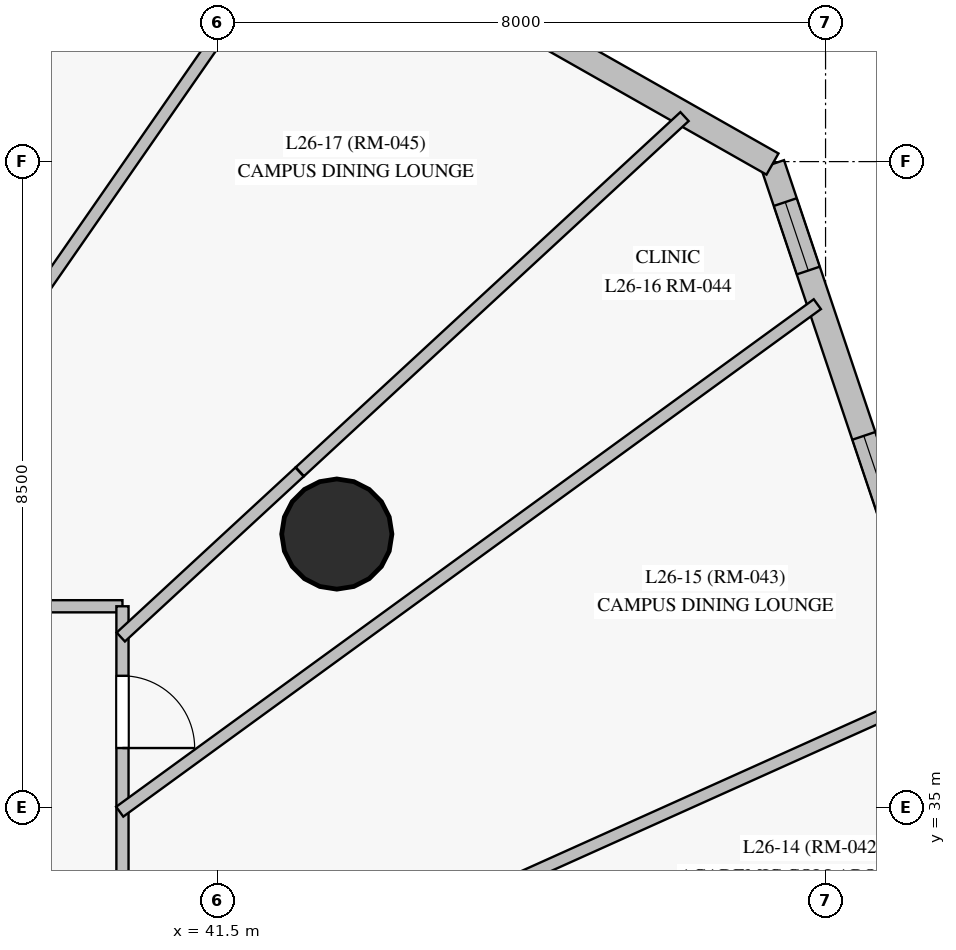
"""IFC4 building model, lengths in metres.
Left out: names, types, materials, properties, quantities, classifications, styles, units other than length and angle.
Written with IfcOpenShell. Run it as: python <this file> out.ifc"""

import sys

from ifc_helpers import new_model, si_unit, direction, frame, frame_2d, origin, origin_with_axes, origin_2d, place, context, subcontext, project, spatial, rectangle, circle, extrude, source, transform, mapped, element, fill, save


model = new_model("IFC4")
c1 = context("Model", 3, precision=1e-05, world=origin(), true_north=direction((0.0, 1.0)))
c2 = subcontext(c1, "Body", "Model", "MODEL_VIEW")
j1 = project(units=[si_unit("LENGTHUNIT", "METRE"), si_unit("PLANEANGLEUNIT", "RADIAN")], contexts=[c1])
p1 = place(None, origin())
s1 = spatial("IfcSite", under=j1, at=p1, CompositionType="ELEMENT")
p2 = place(p1, origin())
s2 = spatial("IfcBuilding", under=s1, at=p2, CompositionType="ELEMENT")
p3 = place(p2, frame((0.0, 0.0, 99.25)))
s3 = spatial("IfcBuildingStorey", under=s2, at=p3, CompositionType="ELEMENT", Elevation=99.25)
m1 = source(origin_with_axes(), c2, "Body", "SweptSolid", [
    extrude(circle(Radius=0.725, at=origin_2d()), origin(), (0.0, 0.0, 1.0), 3.05),
])
p4 = place(p3, frame((43.07, 38.6, 0.0), z_axis=(0.0, 0.0, 1.0), x_axis=(1.0, 0.0, 0.0)))
e1 = element("IfcColumn", 1, at=p4, inside=s3, PredefinedType="COLUMN", context=c2, shape_type="MappedRepresentation", body=[
    mapped(m1, transform((0.0, 0.0, 0.0), scale=1.0)),
])
p5 = place(p3, frame((51.986, 33.989, 0.0), z_axis=(0.0, 0.0, 1.0), x_axis=(-0.318475543546, 0.947931077749, 0.0)))
e2 = element("IfcWall", 2, at=p5, inside=s3, PredefinedType="SOLIDWALL", context=c2, shape_type="SweptSolid", body=[
    extrude(rectangle(XDim=10.0, YDim=0.32, at=frame_2d((5.0, 0.0))), origin(), (0.0, 0.0, 1.0), 2.825),
])
p6 = place(p5, frame((0.58, 0.0, 0.85)))
e3 = element("IfcOpeningElement", 3, at=p6, cuts=e2, PredefinedType="OPENING", context=c2, shape_type="SweptSolid", body=[
    extrude(rectangle(XDim=1.65, YDim=1.65, at=frame_2d((0.825, 0.825))), frame((0.0, 0.17, 0.0), z_axis=(0.0, -1.0, 0.0), x_axis=(1.0, 0.0, 0.0)), (0.0, 0.0, 1.0), 0.34),
])
p7 = place(p5, frame((4.577, 0.0, 0.85)))
e4 = element("IfcOpeningElement", 4, at=p7, cuts=e2, PredefinedType="OPENING", context=c2, shape_type="SweptSolid", body=[
    extrude(rectangle(XDim=1.65, YDim=1.65, at=frame_2d((0.825, 0.825))), frame((0.0, 0.17, 0.0), z_axis=(0.0, -1.0, 0.0), x_axis=(1.0, 0.0, 0.0)), (0.0, 0.0, 1.0), 0.34),
])
p8 = place(p5, frame((8.521, 0.0, 0.85)))
e5 = element("IfcOpeningElement", 5, at=p8, cuts=e2, PredefinedType="OPENING", context=c2, shape_type="SweptSolid", body=[
    extrude(rectangle(XDim=0.95, YDim=1.5, at=frame_2d((0.475, 0.75))), frame((0.0, 0.17, 0.0), z_axis=(0.0, -1.0, 0.0), x_axis=(1.0, 0.0, 0.0)), (0.0, 0.0, 1.0), 0.34),
])
p9 = place(p3, frame((48.802, 43.468, 0.0), z_axis=(0.0, 0.0, 1.0), x_axis=(-0.869711119525, 0.49356110926, 0.0)))
e6 = element("IfcWall", 6, at=p9, inside=s3, PredefinedType="SOLIDWALL", context=c2, shape_type="SweptSolid", body=[
    extrude(rectangle(XDim=12.474, YDim=0.32, at=frame_2d((6.237, 0.0))), origin(), (0.0, 0.0, 1.0), 2.825),
])
p10 = place(p9, frame((3.327, 0.0, 0.85)))
e7 = element("IfcOpeningElement", 7, at=p10, cuts=e6, PredefinedType="OPENING", context=c2, shape_type="SweptSolid", body=[
    extrude(rectangle(XDim=1.65, YDim=1.65, at=frame_2d((0.825, 0.825))), frame((0.0, 0.17, 0.0), z_axis=(0.0, -1.0, 0.0), x_axis=(1.0, 0.0, 0.0)), (0.0, 0.0, 1.0), 0.34),
])
p11 = place(p9, frame((7.578, 0.0, 0.85)))
e8 = element("IfcOpeningElement", 8, at=p11, cuts=e6, PredefinedType="OPENING", context=c2, shape_type="SweptSolid", body=[
    extrude(rectangle(XDim=1.65, YDim=1.65, at=frame_2d((0.825, 0.825))), frame((0.0, 0.17, 0.0), z_axis=(0.0, -1.0, 0.0), x_axis=(1.0, 0.0, 0.0)), (0.0, 0.0, 1.0), 0.34),
])
p12 = place(p9, frame((10.296, 0.0, 0.85)))
e9 = element("IfcOpeningElement", 9, at=p12, cuts=e6, PredefinedType="OPENING", context=c2, shape_type="SweptSolid", body=[
    extrude(rectangle(XDim=1.65, YDim=1.65, at=frame_2d((0.825, 0.825))), frame((0.0, 0.17, 0.0), z_axis=(0.0, -1.0, 0.0), x_axis=(1.0, 0.0, 0.0)), (0.0, 0.0, 1.0), 0.34),
])
p13 = place(p3, frame((10.613, 37.65, 0.0), z_axis=(0.0, 0.0, 1.0), x_axis=(1.0, 0.0, 0.0)))
e10 = element("IfcWall", 10, at=p13, inside=s3, PredefinedType="PARTITIONING", context=c2, shape_type="SweptSolid", body=[
    extrude(rectangle(XDim=29.637, YDim=0.16, at=frame_2d((14.819, 0.0))), origin(), (0.0, 0.0, 1.0), 2.325),
])
p14 = place(p13, frame((27.147, 0.0, 0.0)))
e11 = element("IfcOpeningElement", 11, at=p14, cuts=e10, PredefinedType="OPENING", context=c2, shape_type="SweptSolid", body=[
    extrude(rectangle(XDim=0.95, YDim=2.15, at=frame_2d((0.475, 1.075))), frame((0.0, 0.09, 0.0), z_axis=(0.0, -1.0, 0.0), x_axis=(1.0, 0.0, 0.0)), (0.0, 0.0, 1.0), 0.18),
])
p15 = place(p13, frame((24.44, 0.0, 0.0)))
e12 = element("IfcOpeningElement", 12, at=p15, cuts=e10, PredefinedType="OPENING", context=c2, shape_type="SweptSolid", body=[
    extrude(rectangle(XDim=0.95, YDim=2.15, at=frame_2d((0.475, 1.075))), frame((0.0, 0.09, 0.0), z_axis=(0.0, -1.0, 0.0), x_axis=(1.0, 0.0, 0.0)), (0.0, 0.0, 1.0), 0.18),
])
p16 = place(p13, frame((22.358, 0.0, 0.0)))
e13 = element("IfcOpeningElement", 13, at=p16, cuts=e10, PredefinedType="OPENING", context=c2, shape_type="SweptSolid", body=[
    extrude(rectangle(XDim=0.95, YDim=2.15, at=frame_2d((0.475, 1.075))), frame((0.0, 0.09, 0.0), z_axis=(0.0, -1.0, 0.0), x_axis=(1.0, 0.0, 0.0)), (0.0, 0.0, 1.0), 0.18),
])
p17 = place(p13, frame((20.084, 0.0, 0.0)))
e14 = element("IfcOpeningElement", 14, at=p17, cuts=e10, PredefinedType="OPENING", context=c2, shape_type="SweptSolid", body=[
    extrude(rectangle(XDim=0.95, YDim=2.15, at=frame_2d((0.475, 1.075))), frame((0.0, 0.09, 0.0), z_axis=(0.0, -1.0, 0.0), x_axis=(1.0, 0.0, 0.0)), (0.0, 0.0, 1.0), 0.18),
])
p18 = place(p13, frame((18.225, 0.0, 0.0)))
e15 = element("IfcOpeningElement", 15, at=p18, cuts=e10, PredefinedType="OPENING", context=c2, shape_type="SweptSolid", body=[
    extrude(rectangle(XDim=0.95, YDim=2.15, at=frame_2d((0.475, 1.075))), frame((0.0, 0.09, 0.0), z_axis=(0.0, -1.0, 0.0), x_axis=(1.0, 0.0, 0.0)), (0.0, 0.0, 1.0), 0.18),
])
p19 = place(p13, frame((15.805, 0.0, 0.0)))
e16 = element("IfcOpeningElement", 16, at=p19, cuts=e10, PredefinedType="OPENING", context=c2, shape_type="SweptSolid", body=[
    extrude(rectangle(XDim=0.95, YDim=2.15, at=frame_2d((0.475, 1.075))), frame((0.0, 0.09, 0.0), z_axis=(0.0, -1.0, 0.0), x_axis=(1.0, 0.0, 0.0)), (0.0, 0.0, 1.0), 0.18),
])
p20 = place(p13, frame((10.148, 0.0, 0.0)))
e17 = element("IfcOpeningElement", 17, at=p20, cuts=e10, PredefinedType="OPENING", context=c2, shape_type="SweptSolid", body=[
    extrude(rectangle(XDim=0.95, YDim=2.15, at=frame_2d((0.475, 1.075))), frame((0.0, 0.09, 0.0), z_axis=(0.0, -1.0, 0.0), x_axis=(1.0, 0.0, 0.0)), (0.0, 0.0, 1.0), 0.18),
])
p21 = place(p13, frame((7.296, 0.0, 0.0)))
e18 = element("IfcOpeningElement", 18, at=p21, cuts=e10, PredefinedType="OPENING", context=c2, shape_type="SweptSolid", body=[
    extrude(rectangle(XDim=0.95, YDim=2.15, at=frame_2d((0.475, 1.075))), frame((0.0, 0.09, 0.0), z_axis=(0.0, -1.0, 0.0), x_axis=(1.0, 0.0, 0.0)), (0.0, 0.0, 1.0), 0.18),
])
p22 = place(p3, frame((40.25, 37.65, 0.0), z_axis=(0.0, 0.0, 1.0), x_axis=(0.0, -1.0, 0.0)))
e19 = element("IfcWall", 19, at=p22, inside=s3, PredefinedType="PARTITIONING", context=c2, shape_type="SweptSolid", body=[
    extrude(rectangle(XDim=22.3, YDim=0.16, at=frame_2d((11.15, 0.0))), origin(), (0.0, 0.0, 1.0), 2.225),
])
p23 = place(p22, frame((18.866, 0.0, 0.0)))
e20 = element("IfcOpeningElement", 20, at=p23, cuts=e19, PredefinedType="OPENING", context=c2, shape_type="SweptSolid", body=[
    extrude(rectangle(XDim=0.95, YDim=2.15, at=frame_2d((0.475, 1.075))), frame((0.0, 0.09, 0.0), z_axis=(0.0, -1.0, 0.0), x_axis=(1.0, 0.0, 0.0)), (0.0, 0.0, 1.0), 0.18),
])
p24 = place(p22, frame((11.015, 0.0, 0.0)))
e21 = element("IfcOpeningElement", 21, at=p24, cuts=e19, PredefinedType="OPENING", context=c2, shape_type="SweptSolid", body=[
    extrude(rectangle(XDim=0.95, YDim=2.15, at=frame_2d((0.475, 1.075))), frame((0.0, 0.09, 0.0), z_axis=(0.0, -1.0, 0.0), x_axis=(1.0, 0.0, 0.0)), (0.0, 0.0, 1.0), 0.18),
])
p25 = place(p22, frame((8.866, 0.0, 0.0)))
e22 = element("IfcOpeningElement", 22, at=p25, cuts=e19, PredefinedType="OPENING", context=c2, shape_type="SweptSolid", body=[
    extrude(rectangle(XDim=0.95, YDim=2.15, at=frame_2d((0.475, 1.075))), frame((0.0, 0.09, 0.0), z_axis=(0.0, -1.0, 0.0), x_axis=(1.0, 0.0, 0.0)), (0.0, 0.0, 1.0), 0.18),
])
p26 = place(p22, frame((6.84, 0.0, 0.0)))
e23 = element("IfcOpeningElement", 23, at=p26, cuts=e19, PredefinedType="OPENING", context=c2, shape_type="SweptSolid", body=[
    extrude(rectangle(XDim=0.95, YDim=2.15, at=frame_2d((0.475, 1.075))), frame((0.0, 0.09, 0.0), z_axis=(0.0, -1.0, 0.0), x_axis=(1.0, 0.0, 0.0)), (0.0, 0.0, 1.0), 0.18),
])
p27 = place(p22, frame((4.56, 0.0, 0.0)))
e24 = element("IfcOpeningElement", 24, at=p27, cuts=e19, PredefinedType="OPENING", context=c2, shape_type="SweptSolid", body=[
    extrude(rectangle(XDim=0.95, YDim=2.15, at=frame_2d((0.475, 1.075))), frame((0.0, 0.09, 0.0), z_axis=(0.0, -1.0, 0.0), x_axis=(1.0, 0.0, 0.0)), (0.0, 0.0, 1.0), 0.18),
])
p28 = place(p22, frame((0.915, 0.0, 0.0)))
e25 = element("IfcOpeningElement", 25, at=p28, cuts=e19, PredefinedType="OPENING", context=c2, shape_type="SweptSolid", body=[
    extrude(rectangle(XDim=0.95, YDim=2.15, at=frame_2d((0.475, 1.075))), frame((0.0, 0.09, 0.0), z_axis=(0.0, -1.0, 0.0), x_axis=(1.0, 0.0, 0.0)), (0.0, 0.0, 1.0), 0.18),
])
p29 = place(p3, frame((34.518, 37.61, 0.0), z_axis=(0.0, 0.0, 1.0), x_axis=(0.472106285864, 0.881541635346, 0.0)))
e26 = element("IfcWall", 26, at=p29, inside=s3, PredefinedType="PARTITIONING", context=c2, shape_type="SweptSolid", body=[
    extrude(rectangle(XDim=12.123, YDim=0.16, at=frame_2d((6.062, 0.0))), origin(), (0.0, 0.0, 1.0), 2.825),
])
p30 = place(p3, frame((40.209, 31.7, 0.0), z_axis=(0.0, 0.0, 1.0), x_axis=(0.912009584373, 0.410168889619, 0.0)))
e27 = element("IfcWall", 27, at=p30, inside=s3, PredefinedType="PARTITIONING", context=c2, shape_type="SweptSolid", body=[
    extrude(rectangle(XDim=11.926, YDim=0.16, at=frame_2d((5.963, 0.0))), origin(), (0.0, 0.0, 1.0), 2.825),
])
p31 = place(p3, frame((40.214, 34.947, 0.0), z_axis=(0.0, 0.0, 1.0), x_axis=(0.808655151719, 0.588282963887, 0.0)))
e28 = element("IfcWall", 28, at=p31, inside=s3, PredefinedType="PARTITIONING", context=c2, shape_type="SweptSolid", body=[
    extrude(rectangle(XDim=11.35, YDim=0.16, at=frame_2d((5.675, 0.0))), origin(), (0.0, 0.0, 1.0), 2.825),
])
p32 = place(p3, frame((36.285, 37.613, 0.0), z_axis=(0.0, 0.0, 1.0), x_axis=(0.570151843244, 0.821539332987, 0.0)))
e29 = element("IfcWall", 29, at=p32, inside=s3, PredefinedType="PARTITIONING", context=c2, shape_type="SweptSolid", body=[
    extrude(rectangle(XDim=11.291, YDim=0.16, at=frame_2d((5.646, 0.0))), origin(), (0.0, 0.0, 1.0), 2.825),
])
p33 = place(p3, frame((42.584, 39.42, 0.0), z_axis=(0.0, 0.0, 1.0), x_axis=(0.734757240963, 0.678330153283, 0.0)))
e30 = element("IfcWall", 30, at=p33, inside=s3, PredefinedType="PARTITIONING", context=c2, shape_type="SweptSolid", body=[
    extrude(rectangle(XDim=6.888, YDim=0.16, at=frame_2d((3.444, 0.0))), origin(), (0.0, 0.0, 1.0), 2.825),
])
p34 = place(p3, frame((40.228, 37.245, 0.0), z_axis=(0.0, 0.0, 1.0), x_axis=(0.734765427386, 0.678321285762, 0.0)))
e31 = element("IfcWall", 31, at=p34, inside=s3, PredefinedType="PARTITIONING", context=c2, shape_type="SweptSolid", body=[
    extrude(rectangle(XDim=3.201, YDim=0.16, at=frame_2d((1.6, 0.0))), origin(), (0.0, 0.0, 1.0), 2.225),
])
m2 = source(origin_with_axes(), c2, "Body", "SweptSolid", [
    extrude(rectangle(XDim=1.65, YDim=1.65, at=frame_2d((0.825, 0.825))), frame((0.0, 0.03, 0.0), z_axis=(0.0, -1.0, 0.0), x_axis=(1.0, 0.0, 0.0)), (0.0, 0.0, 1.0), 0.06),
])
p35 = place(p7, origin())
e32 = element("IfcWindow", 32, at=p35, inside=s3, PartitioningType="SINGLE_PANEL", PredefinedType="WINDOW", context=c2, shape_type="MappedRepresentation", body=[
    mapped(m2, transform((0.0, 0.0, 0.0), scale=1.0)),
])
fill(e4, e32)
m3 = source(origin_with_axes(), c2, "Body", "SweptSolid", [
    extrude(rectangle(XDim=0.95, YDim=1.5, at=frame_2d((0.475, 0.75))), frame((0.0, 0.03, 0.0), z_axis=(0.0, -1.0, 0.0), x_axis=(1.0, 0.0, 0.0)), (0.0, 0.0, 1.0), 0.06),
])
p36 = place(p8, origin())
e33 = element("IfcWindow", 33, at=p36, inside=s3, PartitioningType="SINGLE_PANEL", PredefinedType="WINDOW", context=c2, shape_type="MappedRepresentation", body=[
    mapped(m3, transform((0.0, 0.0, 0.0), scale=1.0)),
])
fill(e5, e33)
m4 = source(origin_with_axes(), c2, "Body", "SweptSolid", [
    extrude(rectangle(XDim=0.95, YDim=2.15, at=frame_2d((0.475, 1.075))), frame((0.0, 0.025, 0.0), z_axis=(0.0, -1.0, 0.0), x_axis=(1.0, 0.0, 0.0)), (0.0, 0.0, 1.0), 0.05),
])
p37 = place(p28, origin())
e34 = element("IfcDoor", 34, at=p37, inside=s3, OperationType="SINGLE_SWING_RIGHT", PredefinedType="DOOR", context=c2, shape_type="MappedRepresentation", body=[
    mapped(m4, transform((0.0, 0.0, 0.0), scale=1.0)),
])
fill(e25, e34)
save(model, sys.argv[1])
